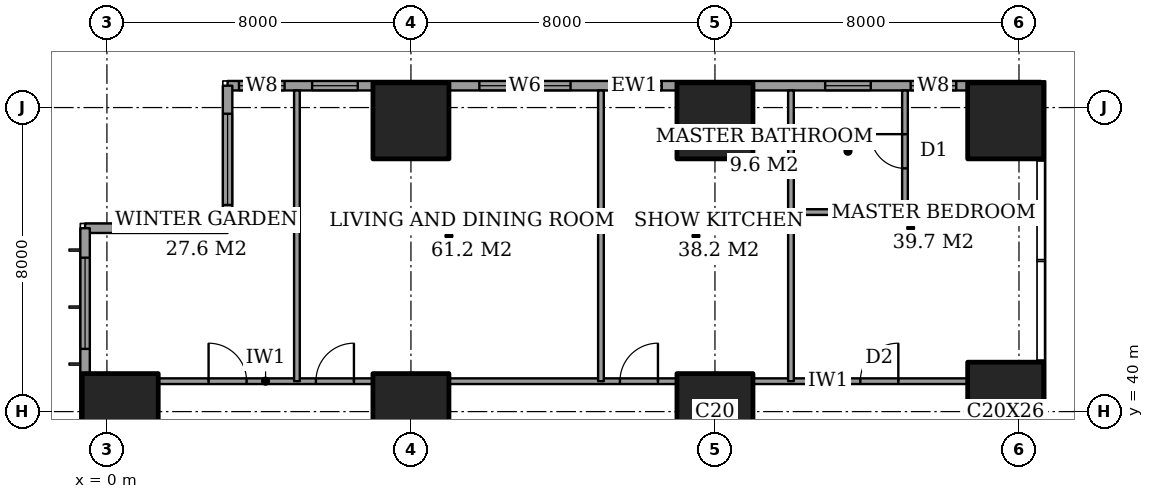
"""IFC4 building model, lengths in metres.
Left out: names, types, materials, properties, quantities, classifications, styles, units other than length and angle.
Written with IfcOpenShell. Run it as: python <this file> out.ifc"""

import sys

from ifc_helpers import new_model, si_unit, direction, frame, frame_2d, origin, origin_2d, place, context, subcontext, project, spatial, rectangle, extrude, element, fill, save


model = new_model("IFC4")
c1 = context("Model", 3, precision=1e-05, world=origin(), true_north=direction((0.0, 1.0)))
c2 = subcontext(c1, "Body", "Model", "MODEL_VIEW")
j1 = project(units=[si_unit("LENGTHUNIT", "METRE"), si_unit("PLANEANGLEUNIT", "RADIAN")], contexts=[c1])
p1 = place(None, origin())
s1 = spatial("IfcSite", under=j1, at=p1, CompositionType="ELEMENT")
p2 = place(p1, origin())
s2 = spatial("IfcBuilding", under=s1, at=p2, CompositionType="ELEMENT")
p3 = place(p2, frame((0.0, 0.0, 51.2)))
s3 = spatial("IfcBuildingStorey", under=s2, at=p3, CompositionType="ELEMENT", Elevation=51.2)
for number, where, z_axis, x_axis in (
    (1, (0.35, 40.0, 0.0), (0.0, 0.0, 1.0), (1.0, 0.0, 0.0)),
    (2, (8.0, 40.0, 0.0), (0.0, 0.0, 1.0), (1.0, 0.0, 0.0)),
    (3, (8.0, 47.65, 0.0), (0.0, 0.0, 1.0), (1.0, 0.0, 0.0)),
    (4, (16.0, 40.0, 0.0), (0.0, 0.0, 1.0), (1.0, 0.0, 0.0)),
    (5, (16.0, 47.65, 0.0), (0.0, 0.0, 1.0), (1.0, 0.0, 0.0)),
):
    element("IfcColumn", number, at=place(p3, frame(where, z_axis=z_axis, x_axis=x_axis)), inside=s3, PredefinedType="COLUMN", context=c2, shape_type="SweptSolid", body=[
        extrude(rectangle(XDim=2.0, YDim=2.0, at=origin_2d()), origin(), (0.0, 0.0, 1.0), 3.6),
    ])
p4 = place(p3, frame((23.65, 40.0, 0.0), z_axis=(0.0, 0.0, 1.0), x_axis=(1.0, 0.0, 0.0)))
e6 = element("IfcColumn", 6, at=p4, inside=s3, PredefinedType="COLUMN", context=c2, shape_type="SweptSolid", body=[
    extrude(rectangle(XDim=2.0, YDim=2.6, at=origin_2d()), origin(), (0.0, 0.0, 1.0), 3.6),
])
p5 = place(p3, frame((23.65, 47.65, 0.0), z_axis=(0.0, 0.0, 1.0), x_axis=(1.0, 0.0, 0.0)))
e7 = element("IfcColumn", 7, at=p5, inside=s3, PredefinedType="COLUMN", context=c2, shape_type="SweptSolid", body=[
    extrude(rectangle(XDim=2.0, YDim=2.0, at=origin_2d()), origin(), (0.0, 0.0, 1.0), 3.6),
])
p6 = place(p3, frame((24.575, 48.575, 0.0), z_axis=(0.0, 0.0, 1.0), x_axis=(-1.0, 0.0, 0.0)))
e8 = element("IfcWall", 8, at=p6, inside=s3, PredefinedType="SOLIDWALL", context=c2, shape_type="SweptSolid", body=[
    extrude(rectangle(XDim=21.4, YDim=0.25, at=frame_2d((10.7, 0.0))), origin(), (0.0, 0.0, 1.0), 3.6),
])
p7 = place(p6, frame((2.225, 0.0, 0.6)))
e9 = element("IfcOpeningElement", 9, at=p7, cuts=e8, PredefinedType="OPENING", context=c2, shape_type="SweptSolid", body=[
    extrude(rectangle(XDim=1.2, YDim=2.0, at=frame_2d((0.6, 1.0))), frame((0.0, 0.135, 0.0), z_axis=(0.0, -1.0, 0.0), x_axis=(1.0, 0.0, 0.0)), (0.0, 0.0, 1.0), 0.27),
])
p8 = place(p6, frame((4.475, 0.0, 0.6)))
e10 = element("IfcOpeningElement", 10, at=p8, cuts=e8, PredefinedType="OPENING", context=c2, shape_type="SweptSolid", body=[
    extrude(rectangle(XDim=1.2, YDim=2.0, at=frame_2d((0.6, 1.0))), frame((0.0, 0.135, 0.0), z_axis=(0.0, -1.0, 0.0), x_axis=(1.0, 0.0, 0.0)), (0.0, 0.0, 1.0), 0.27),
])
p9 = place(p6, frame((9.975, 0.0, 0.6)))
e11 = element("IfcOpeningElement", 11, at=p9, cuts=e8, PredefinedType="OPENING", context=c2, shape_type="SweptSolid", body=[
    extrude(rectangle(XDim=1.2, YDim=2.0, at=frame_2d((0.6, 1.0))), frame((0.0, 0.135, 0.0), z_axis=(0.0, -1.0, 0.0), x_axis=(1.0, 0.0, 0.0)), (0.0, 0.0, 1.0), 0.27),
])
p10 = place(p6, frame((12.375, 0.0, 0.6)))
e12 = element("IfcOpeningElement", 12, at=p10, cuts=e8, PredefinedType="OPENING", context=c2, shape_type="SweptSolid", body=[
    extrude(rectangle(XDim=2.4, YDim=2.0, at=frame_2d((1.2, 1.0))), frame((0.0, 0.135, 0.0), z_axis=(0.0, -1.0, 0.0), x_axis=(1.0, 0.0, 0.0)), (0.0, 0.0, 1.0), 0.27),
])
p11 = place(p6, frame((17.975, 0.0, 0.6)))
e13 = element("IfcOpeningElement", 13, at=p11, cuts=e8, PredefinedType="OPENING", context=c2, shape_type="SweptSolid", body=[
    extrude(rectangle(XDim=1.2, YDim=2.0, at=frame_2d((0.6, 1.0))), frame((0.0, 0.135, 0.0), z_axis=(0.0, -1.0, 0.0), x_axis=(1.0, 0.0, 0.0)), (0.0, 0.0, 1.0), 0.27),
])
p12 = place(p6, frame((19.9, 0.0, 0.6)))
e14 = element("IfcOpeningElement", 14, at=p12, cuts=e8, PredefinedType="OPENING", context=c2, shape_type="SweptSolid", body=[
    extrude(rectangle(XDim=1.2, YDim=2.0, at=frame_2d((0.6, 1.0))), frame((0.0, 0.135, 0.0), z_axis=(0.0, -1.0, 0.0), x_axis=(1.0, 0.0, 0.0)), (0.0, 0.0, 1.0), 0.27),
])
p13 = place(p3, frame((3.175, 48.575, 0.0), z_axis=(0.0, 0.0, 1.0), x_axis=(0.0, -1.0, 0.0)))
e15 = element("IfcWall", 15, at=p13, inside=s3, PredefinedType="SOLIDWALL", context=c2, shape_type="SweptSolid", body=[
    extrude(rectangle(XDim=3.75, YDim=0.25, at=frame_2d((1.875, 0.0))), origin(), (0.0, 0.0, 1.0), 3.6),
])
p14 = place(p13, frame((0.738, 0.0, 0.6)))
e16 = element("IfcOpeningElement", 16, at=p14, cuts=e15, PredefinedType="OPENING", context=c2, shape_type="SweptSolid", body=[
    extrude(rectangle(XDim=2.4, YDim=2.0, at=frame_2d((1.2, 1.0))), frame((0.0, 0.135, 0.0), z_axis=(0.0, -1.0, 0.0), x_axis=(1.0, 0.0, 0.0)), (0.0, 0.0, 1.0), 0.27),
])
p15 = place(p3, frame((3.175, 44.825, 0.0), z_axis=(0.0, 0.0, 1.0), x_axis=(-1.0, 0.0, 0.0)))
e17 = element("IfcWall", 17, at=p15, inside=s3, PredefinedType="SOLIDWALL", context=c2, shape_type="SweptSolid", body=[
    extrude(rectangle(XDim=3.75, YDim=0.25, at=frame_2d((1.875, 0.0))), origin(), (0.0, 0.0, 1.0), 3.6),
])
p16 = place(p15, frame((0.613, 0.0, 0.6)))
e18 = element("IfcOpeningElement", 18, at=p16, cuts=e17, PredefinedType="OPENING", context=c2, shape_type="SweptSolid", body=[
    extrude(rectangle(XDim=2.4, YDim=2.0, at=frame_2d((1.2, 1.0))), frame((0.0, 0.135, 0.0), z_axis=(0.0, -1.0, 0.0), x_axis=(1.0, 0.0, 0.0)), (0.0, 0.0, 1.0), 0.27),
])
p17 = place(p3, frame((-0.575, 44.825, 0.0), z_axis=(0.0, 0.0, 1.0), x_axis=(0.0, -1.0, 0.0)))
e19 = element("IfcWall", 19, at=p17, inside=s3, PredefinedType="SOLIDWALL", context=c2, shape_type="SweptSolid", body=[
    extrude(rectangle(XDim=41.65, YDim=0.25, at=frame_2d((20.825, 0.0))), origin(), (0.0, 0.0, 1.0), 3.6),
])
p18 = place(p17, frame((0.775, 0.0, 0.6)))
e20 = element("IfcOpeningElement", 20, at=p18, cuts=e19, PredefinedType="OPENING", context=c2, shape_type="SweptSolid", body=[
    extrude(rectangle(XDim=2.4, YDim=2.0, at=frame_2d((1.2, 1.0))), frame((0.0, 0.135, 0.0), z_axis=(0.0, -1.0, 0.0), x_axis=(1.0, 0.0, 0.0)), (0.0, 0.0, 1.0), 0.27),
])
p19 = place(p17, frame((6.1, 0.0, 0.6)))
e21 = element("IfcOpeningElement", 21, at=p19, cuts=e19, PredefinedType="OPENING", context=c2, shape_type="SweptSolid", body=[
    extrude(rectangle(XDim=1.2, YDim=2.0, at=frame_2d((0.6, 1.0))), frame((0.0, 0.135, 0.0), z_axis=(0.0, -1.0, 0.0), x_axis=(1.0, 0.0, 0.0)), (0.0, 0.0, 1.0), 0.27),
])
p20 = place(p17, frame((8.425, 0.0, 0.6)))
e22 = element("IfcOpeningElement", 22, at=p20, cuts=e19, PredefinedType="OPENING", context=c2, shape_type="SweptSolid", body=[
    extrude(rectangle(XDim=2.4, YDim=2.0, at=frame_2d((1.2, 1.0))), frame((0.0, 0.135, 0.0), z_axis=(0.0, -1.0, 0.0), x_axis=(1.0, 0.0, 0.0)), (0.0, 0.0, 1.0), 0.27),
])
p21 = place(p17, frame((15.625, 0.0, 0.6)))
e23 = element("IfcOpeningElement", 23, at=p21, cuts=e19, PredefinedType="OPENING", context=c2, shape_type="SweptSolid", body=[
    extrude(rectangle(XDim=2.4, YDim=2.0, at=frame_2d((1.2, 1.0))), frame((0.0, 0.135, 0.0), z_axis=(0.0, -1.0, 0.0), x_axis=(1.0, 0.0, 0.0)), (0.0, 0.0, 1.0), 0.27),
])
p22 = place(p17, frame((23.625, 0.0, 0.6)))
e24 = element("IfcOpeningElement", 24, at=p22, cuts=e19, PredefinedType="OPENING", context=c2, shape_type="SweptSolid", body=[
    extrude(rectangle(XDim=2.4, YDim=2.0, at=frame_2d((1.2, 1.0))), frame((0.0, 0.135, 0.0), z_axis=(0.0, -1.0, 0.0), x_axis=(1.0, 0.0, 0.0)), (0.0, 0.0, 1.0), 0.27),
])
p23 = place(p17, frame((30.825, 0.0, 0.6)))
e25 = element("IfcOpeningElement", 25, at=p23, cuts=e19, PredefinedType="OPENING", context=c2, shape_type="SweptSolid", body=[
    extrude(rectangle(XDim=2.4, YDim=2.0, at=frame_2d((1.2, 1.0))), frame((0.0, 0.135, 0.0), z_axis=(0.0, -1.0, 0.0), x_axis=(1.0, 0.0, 0.0)), (0.0, 0.0, 1.0), 0.27),
])
p24 = place(p17, frame((34.5, 0.0, 0.6)))
e26 = element("IfcOpeningElement", 26, at=p24, cuts=e19, PredefinedType="OPENING", context=c2, shape_type="SweptSolid", body=[
    extrude(rectangle(XDim=1.2, YDim=2.0, at=frame_2d((0.6, 1.0))), frame((0.0, 0.135, 0.0), z_axis=(0.0, -1.0, 0.0), x_axis=(1.0, 0.0, 0.0)), (0.0, 0.0, 1.0), 0.27),
])
p25 = place(p17, frame((38.475, 0.0, 0.6)))
e27 = element("IfcOpeningElement", 27, at=p25, cuts=e19, PredefinedType="OPENING", context=c2, shape_type="SweptSolid", body=[
    extrude(rectangle(XDim=2.4, YDim=2.0, at=frame_2d((1.2, 1.0))), frame((0.0, 0.135, 0.0), z_axis=(0.0, -1.0, 0.0), x_axis=(1.0, 0.0, 0.0)), (0.0, 0.0, 1.0), 0.27),
])
p26 = place(p3, frame((1.35, 40.8, 0.0), z_axis=(0.0, 0.0, 1.0), x_axis=(1.0, 0.0, 0.0)))
e28 = element("IfcWall", 28, at=p26, inside=s3, PredefinedType="PARTITIONING", context=c2, shape_type="SweptSolid", body=[
    extrude(rectangle(XDim=5.65, YDim=0.15, at=frame_2d((2.825, 0.0))), origin(), (0.0, 0.0, 1.0), 3.35),
])
p27 = place(p26, frame((1.325, 0.0, 0.0)))
e29 = element("IfcOpeningElement", 29, at=p27, cuts=e28, PredefinedType="OPENING", context=c2, shape_type="SweptSolid", body=[
    extrude(rectangle(XDim=1.0, YDim=2.1, at=frame_2d((0.5, 1.05))), frame((0.0, 0.085, 0.0), z_axis=(0.0, -1.0, 0.0), x_axis=(1.0, 0.0, 0.0)), (0.0, 0.0, 1.0), 0.17),
])
p28 = place(p26, frame((4.15, 0.0, 0.0)))
e30 = element("IfcOpeningElement", 30, at=p28, cuts=e28, PredefinedType="OPENING", context=c2, shape_type="SweptSolid", body=[
    extrude(rectangle(XDim=1.0, YDim=2.1, at=frame_2d((0.5, 1.05))), frame((0.0, 0.085, 0.0), z_axis=(0.0, -1.0, 0.0), x_axis=(1.0, 0.0, 0.0)), (0.0, 0.0, 1.0), 0.17),
])
p29 = place(p3, frame((9.0, 40.8, 0.0), z_axis=(0.0, 0.0, 1.0), x_axis=(1.0, 0.0, 0.0)))
e31 = element("IfcWall", 31, at=p29, inside=s3, PredefinedType="PARTITIONING", context=c2, shape_type="SweptSolid", body=[
    extrude(rectangle(XDim=6.0, YDim=0.15, at=frame_2d((3.0, 0.0))), origin(), (0.0, 0.0, 1.0), 3.35),
])
p30 = place(p29, frame((4.5, 0.0, 0.0)))
e32 = element("IfcOpeningElement", 32, at=p30, cuts=e31, PredefinedType="OPENING", context=c2, shape_type="SweptSolid", body=[
    extrude(rectangle(XDim=1.0, YDim=2.1, at=frame_2d((0.5, 1.05))), frame((0.0, 0.085, 0.0), z_axis=(0.0, -1.0, 0.0), x_axis=(1.0, 0.0, 0.0)), (0.0, 0.0, 1.0), 0.17),
])
p31 = place(p3, frame((17.0, 40.8, 0.0), z_axis=(0.0, 0.0, 1.0), x_axis=(1.0, 0.0, 0.0)))
e33 = element("IfcWall", 33, at=p31, inside=s3, PredefinedType="PARTITIONING", context=c2, shape_type="SweptSolid", body=[
    extrude(rectangle(XDim=5.65, YDim=0.15, at=frame_2d((2.825, 0.0))), origin(), (0.0, 0.0, 1.0), 3.35),
])
p32 = place(p31, frame((2.825, 0.0, 0.0)))
e34 = element("IfcOpeningElement", 34, at=p32, cuts=e33, PredefinedType="OPENING", context=c2, shape_type="SweptSolid", body=[
    extrude(rectangle(XDim=1.0, YDim=2.1, at=frame_2d((0.5, 1.05))), frame((0.0, 0.085, 0.0), z_axis=(0.0, -1.0, 0.0), x_axis=(1.0, 0.0, 0.0)), (0.0, 0.0, 1.0), 0.17),
])
p33 = place(p3, frame((18.0, 45.25, 0.0), z_axis=(0.0, 0.0, 1.0), x_axis=(1.0, 0.0, 0.0)))
e35 = element("IfcWall", 35, at=p33, inside=s3, PredefinedType="PARTITIONING", context=c2, shape_type="SweptSolid", body=[
    extrude(rectangle(XDim=3.0, YDim=0.15, at=frame_2d((1.5, 0.0))), origin(), (0.0, 0.0, 1.0), 3.35),
])
for number, where, z_axis, x_axis in (
    (36, (5.0, 40.8, 0.0), (0.0, 0.0, 1.0), (0.0, 1.0, 0.0)),
    (37, (13.0, 40.8, 0.0), (0.0, 0.0, 1.0), (0.0, 1.0, 0.0)),
    (38, (18.0, 40.8, 0.0), (0.0, 0.0, 1.0), (0.0, 1.0, 0.0)),
):
    element("IfcWall", number, at=place(p3, frame(where, z_axis=z_axis, x_axis=x_axis)), inside=s3, PredefinedType="PARTITIONING", context=c2, shape_type="SweptSolid", body=[
        extrude(rectangle(XDim=7.65, YDim=0.15, at=frame_2d((3.825, 0.0))), origin(), (0.0, 0.0, 1.0), 3.35),
    ])
p34 = place(p3, frame((21.0, 45.25, 0.0), z_axis=(0.0, 0.0, 1.0), x_axis=(0.0, 1.0, 0.0)))
e39 = element("IfcWall", 39, at=p34, inside=s3, PredefinedType="PARTITIONING", context=c2, shape_type="SweptSolid", body=[
    extrude(rectangle(XDim=3.2, YDim=0.15, at=frame_2d((1.6, 0.0))), origin(), (0.0, 0.0, 1.0), 3.35),
])
p35 = place(p34, frame((1.15, 0.0, 0.0)))
e40 = element("IfcOpeningElement", 40, at=p35, cuts=e39, PredefinedType="OPENING", context=c2, shape_type="SweptSolid", body=[
    extrude(rectangle(XDim=0.9, YDim=2.1, at=frame_2d((0.45, 1.05))), frame((0.0, 0.085, 0.0), z_axis=(0.0, -1.0, 0.0), x_axis=(1.0, 0.0, 0.0)), (0.0, 0.0, 1.0), 0.17),
])
p36 = place(p7, origin())
e41 = element("IfcWindow", 41, at=p36, inside=s3, PartitioningType="SINGLE_PANEL", PredefinedType="WINDOW", context=c2, shape_type="SweptSolid", body=[
    extrude(rectangle(XDim=1.2, YDim=2.0, at=frame_2d((0.6, 1.0))), frame((0.0, 0.03, 0.0), z_axis=(0.0, -1.0, 0.0), x_axis=(1.0, 0.0, 0.0)), (0.0, 0.0, 1.0), 0.06),
])
fill(e9, e41)
p37 = place(p8, origin())
e42 = element("IfcWindow", 42, at=p37, inside=s3, PartitioningType="SINGLE_PANEL", PredefinedType="WINDOW", context=c2, shape_type="SweptSolid", body=[
    extrude(rectangle(XDim=1.2, YDim=2.0, at=frame_2d((0.6, 1.0))), frame((0.0, 0.03, 0.0), z_axis=(0.0, -1.0, 0.0), x_axis=(1.0, 0.0, 0.0)), (0.0, 0.0, 1.0), 0.06),
])
fill(e10, e42)
p38 = place(p9, origin())
e43 = element("IfcWindow", 43, at=p38, inside=s3, PartitioningType="SINGLE_PANEL", PredefinedType="WINDOW", context=c2, shape_type="SweptSolid", body=[
    extrude(rectangle(XDim=1.2, YDim=2.0, at=frame_2d((0.6, 1.0))), frame((0.0, 0.03, 0.0), z_axis=(0.0, -1.0, 0.0), x_axis=(1.0, 0.0, 0.0)), (0.0, 0.0, 1.0), 0.06),
])
fill(e11, e43)
p39 = place(p10, origin())
e44 = element("IfcWindow", 44, at=p39, inside=s3, PartitioningType="SINGLE_PANEL", PredefinedType="WINDOW", context=c2, shape_type="SweptSolid", body=[
    extrude(rectangle(XDim=2.4, YDim=2.0, at=frame_2d((1.2, 1.0))), frame((0.0, 0.03, 0.0), z_axis=(0.0, -1.0, 0.0), x_axis=(1.0, 0.0, 0.0)), (0.0, 0.0, 1.0), 0.06),
])
fill(e12, e44)
p40 = place(p11, origin())
e45 = element("IfcWindow", 45, at=p40, inside=s3, PartitioningType="SINGLE_PANEL", PredefinedType="WINDOW", context=c2, shape_type="SweptSolid", body=[
    extrude(rectangle(XDim=1.2, YDim=2.0, at=frame_2d((0.6, 1.0))), frame((0.0, 0.03, 0.0), z_axis=(0.0, -1.0, 0.0), x_axis=(1.0, 0.0, 0.0)), (0.0, 0.0, 1.0), 0.06),
])
fill(e13, e45)
p41 = place(p12, origin())
e46 = element("IfcWindow", 46, at=p41, inside=s3, PartitioningType="SINGLE_PANEL", PredefinedType="WINDOW", context=c2, shape_type="SweptSolid", body=[
    extrude(rectangle(XDim=1.2, YDim=2.0, at=frame_2d((0.6, 1.0))), frame((0.0, 0.03, 0.0), z_axis=(0.0, -1.0, 0.0), x_axis=(1.0, 0.0, 0.0)), (0.0, 0.0, 1.0), 0.06),
])
fill(e14, e46)
p42 = place(p14, origin())
e47 = element("IfcWindow", 47, at=p42, inside=s3, PartitioningType="SINGLE_PANEL", PredefinedType="WINDOW", context=c2, shape_type="SweptSolid", body=[
    extrude(rectangle(XDim=2.4, YDim=2.0, at=frame_2d((1.2, 1.0))), frame((0.0, 0.03, 0.0), z_axis=(0.0, -1.0, 0.0), x_axis=(1.0, 0.0, 0.0)), (0.0, 0.0, 1.0), 0.06),
])
fill(e16, e47)
p43 = place(p16, origin())
e48 = element("IfcWindow", 48, at=p43, inside=s3, PartitioningType="SINGLE_PANEL", PredefinedType="WINDOW", context=c2, shape_type="SweptSolid", body=[
    extrude(rectangle(XDim=2.4, YDim=2.0, at=frame_2d((1.2, 1.0))), frame((0.0, 0.03, 0.0), z_axis=(0.0, -1.0, 0.0), x_axis=(1.0, 0.0, 0.0)), (0.0, 0.0, 1.0), 0.06),
])
fill(e18, e48)
p44 = place(p18, origin())
e49 = element("IfcWindow", 49, at=p44, inside=s3, PartitioningType="SINGLE_PANEL", PredefinedType="WINDOW", context=c2, shape_type="SweptSolid", body=[
    extrude(rectangle(XDim=2.4, YDim=2.0, at=frame_2d((1.2, 1.0))), frame((0.0, 0.03, 0.0), z_axis=(0.0, -1.0, 0.0), x_axis=(1.0, 0.0, 0.0)), (0.0, 0.0, 1.0), 0.06),
])
fill(e20, e49)
p45 = place(p27, origin())
e50 = element("IfcDoor", 50, at=p45, inside=s3, OperationType="SINGLE_SWING_RIGHT", PredefinedType="DOOR", context=c2, shape_type="SweptSolid", body=[
    extrude(rectangle(XDim=1.0, YDim=2.1, at=frame_2d((0.5, 1.05))), frame((0.0, 0.025, 0.0), z_axis=(0.0, -1.0, 0.0), x_axis=(1.0, 0.0, 0.0)), (0.0, 0.0, 1.0), 0.05),
])
fill(e29, e50)
p46 = place(p28, origin())
e51 = element("IfcDoor", 51, at=p46, inside=s3, OperationType="SINGLE_SWING_LEFT", PredefinedType="DOOR", context=c2, shape_type="SweptSolid", body=[
    extrude(rectangle(XDim=1.0, YDim=2.1, at=frame_2d((0.5, 1.05))), frame((0.0, 0.025, 0.0), z_axis=(0.0, -1.0, 0.0), x_axis=(1.0, 0.0, 0.0)), (0.0, 0.0, 1.0), 0.05),
])
fill(e30, e51)
p47 = place(p30, origin())
e52 = element("IfcDoor", 52, at=p47, inside=s3, OperationType="SINGLE_SWING_LEFT", PredefinedType="DOOR", context=c2, shape_type="SweptSolid", body=[
    extrude(rectangle(XDim=1.0, YDim=2.1, at=frame_2d((0.5, 1.05))), frame((0.0, 0.025, 0.0), z_axis=(0.0, -1.0, 0.0), x_axis=(1.0, 0.0, 0.0)), (0.0, 0.0, 1.0), 0.05),
])
fill(e32, e52)
p48 = place(p35, origin())
e53 = element("IfcDoor", 53, at=p48, inside=s3, OperationType="SINGLE_SWING_LEFT", PredefinedType="DOOR", context=c2, shape_type="SweptSolid", body=[
    extrude(rectangle(XDim=0.9, YDim=2.1, at=frame_2d((0.45, 1.05))), frame((0.0, 0.025, 0.0), z_axis=(0.0, -1.0, 0.0), x_axis=(1.0, 0.0, 0.0)), (0.0, 0.0, 1.0), 0.05),
])
fill(e40, e53)
p49 = place(p32, origin())
e54 = element("IfcDoor", 54, at=p49, inside=s3, OperationType="SINGLE_SWING_LEFT", PredefinedType="DOOR", context=c2, shape_type="SweptSolid", body=[
    extrude(rectangle(XDim=1.0, YDim=2.1, at=frame_2d((0.5, 1.05))), frame((0.0, 0.025, 0.0), z_axis=(0.0, -1.0, 0.0), x_axis=(1.0, 0.0, 0.0)), (0.0, 0.0, 1.0), 0.05),
])
fill(e34, e54)
save(model, sys.argv[1])
